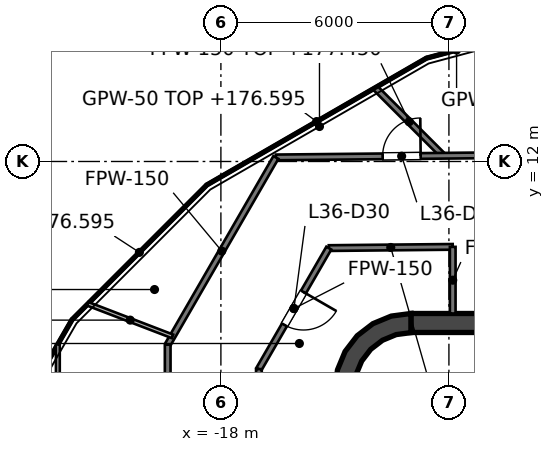
"""IFC4 building model, lengths in metres.
Left out: names, types, materials, properties, quantities, classifications, styles, units other than length and angle.
Written with IfcOpenShell. Run it as: python <this file> out.ifc"""

import sys

from ifc_helpers import new_model, si_unit, direction, frame, frame_2d, origin, place, context, subcontext, project, spatial, polyline, rectangle, outline, extrude, element, fill, save


model = new_model("IFC4")
c1 = context("Model", 3, precision=1e-05, world=origin(), true_north=direction((0.0, 1.0)))
c2 = subcontext(c1, "Body", "Model", "MODEL_VIEW")
j1 = project(units=[si_unit("LENGTHUNIT", "METRE"), si_unit("PLANEANGLEUNIT", "RADIAN")], contexts=[c1])
p1 = place(None, origin())
s1 = spatial("IfcSite", under=j1, at=p1, CompositionType="ELEMENT")
p2 = place(p1, origin())
s2 = spatial("IfcBuilding", under=s1, at=p2, CompositionType="ELEMENT")
p3 = place(p2, frame((0.0, 0.0, 173.6)))
s3 = spatial("IfcBuildingStorey", under=s2, at=p3, CompositionType="ELEMENT", Elevation=173.6)
p4 = place(p3, frame((-13.0, 7.75, 0.0), z_axis=(0.0, 0.0, 1.0), x_axis=(1.0, 0.0, 0.0)))
e1 = element("IfcWall", 1, at=p4, inside=s3, PredefinedType="SHEAR", context=c2, shape_type="SweptSolid", body=[
    extrude(rectangle(XDim=26.0, YDim=0.5, at=frame_2d((13.0, 0.0))), origin(), (0.0, 0.0, 1.0), 4.0),
])
p5 = place(p4, frame((1.7, 0.0, 0.0)))
e2 = element("IfcOpeningElement", 2, at=p5, cuts=e1, PredefinedType="OPENING", context=c2, shape_type="SweptSolid", body=[
    extrude(rectangle(XDim=1.8, YDim=2.1, at=frame_2d((0.9, 1.05))), frame((0.0, 0.25, 0.0), z_axis=(0.0, -1.0, 0.0), x_axis=(1.0, 0.0, 0.0)), (0.0, 0.0, 1.0), 0.5),
])
p6 = place(p4, frame((22.5, 0.0, 0.0)))
e3 = element("IfcOpeningElement", 3, at=p6, cuts=e1, PredefinedType="OPENING", context=c2, shape_type="SweptSolid", body=[
    extrude(rectangle(XDim=1.8, YDim=2.1, at=frame_2d((0.9, 1.05))), frame((0.0, 0.25, 0.0), z_axis=(0.0, -1.0, 0.0), x_axis=(1.0, 0.0, 0.0)), (0.0, 0.0, 1.0), 0.5),
])
p7 = place(p3, origin())
e4 = element("IfcWall", 4, at=p7, inside=s3, PredefinedType="SHEAR", context=c2, shape_type="SweptSolid", body=[
    extrude(outline(polyline([(-15.0, 6.0), (-14.496, 6.0), (-14.445, 6.387), (-14.295, 6.748), (-14.058, 7.058), (-13.748, 7.295), (-13.387, 7.445), (-13.0, 7.496), (-13.0, 8.0), (-13.518, 7.932), (-14.0, 7.732), (-14.414, 7.414), (-14.732, 7.0), (-14.932, 6.518), (-15.0, 6.0)])), origin(), (0.0, 0.0, 1.0), 4.0),
])
p8 = place(p3, frame((-11.8, -7.5, 0.0), z_axis=(0.0, 0.0, 1.0), x_axis=(0.0, 1.0, 0.0)))
e5 = element("IfcWall", 5, at=p8, inside=s3, PredefinedType="SOLIDWALL", context=c2, shape_type="SweptSolid", body=[
    extrude(rectangle(XDim=15.0, YDim=0.4, at=frame_2d((7.5, 0.0))), origin(), (0.0, 0.0, 1.0), 3.85),
])
p9 = place(p8, frame((11.3, 0.0, 0.0)))
e6 = element("IfcOpeningElement", 6, at=p9, cuts=e5, PredefinedType="OPENING", context=c2, shape_type="SweptSolid", body=[
    extrude(rectangle(XDim=1.1, YDim=2.1, at=frame_2d((0.55, 1.05))), frame((0.0, 0.2, 0.0), z_axis=(0.0, -1.0, 0.0), x_axis=(1.0, 0.0, 0.0)), (0.0, 0.0, 1.0), 0.4),
])
p10 = place(p8, frame((8.4, 0.0, 0.0)))
e7 = element("IfcOpeningElement", 7, at=p10, cuts=e5, PredefinedType="OPENING", context=c2, shape_type="SweptSolid", body=[
    extrude(rectangle(XDim=1.1, YDim=2.1, at=frame_2d((0.55, 1.05))), frame((0.0, 0.2, 0.0), z_axis=(0.0, -1.0, 0.0), x_axis=(1.0, 0.0, 0.0)), (0.0, 0.0, 1.0), 0.4),
])
p11 = place(p8, frame((5.5, 0.0, 0.0)))
e8 = element("IfcOpeningElement", 8, at=p11, cuts=e5, PredefinedType="OPENING", context=c2, shape_type="SweptSolid", body=[
    extrude(rectangle(XDim=1.1, YDim=2.1, at=frame_2d((0.55, 1.05))), frame((0.0, 0.2, 0.0), z_axis=(0.0, -1.0, 0.0), x_axis=(1.0, 0.0, 0.0)), (0.0, 0.0, 1.0), 0.4),
])
p12 = place(p8, frame((13.697, 0.0, 0.0)))
e9 = element("IfcOpeningElement", 9, at=p12, cuts=e5, PredefinedType="OPENING", context=c2, shape_type="SweptSolid", body=[
    extrude(rectangle(XDim=0.9, YDim=2.1, at=frame_2d((0.45, 1.05))), frame((0.0, 0.2, 0.0), z_axis=(0.0, -1.0, 0.0), x_axis=(1.0, 0.0, 0.0)), (0.0, 0.0, 1.0), 0.4),
])
p13 = place(p8, frame((0.403, 0.0, 0.0)))
e10 = element("IfcOpeningElement", 10, at=p13, cuts=e5, PredefinedType="OPENING", context=c2, shape_type="SweptSolid", body=[
    extrude(rectangle(XDim=0.9, YDim=2.1, at=frame_2d((0.45, 1.05))), frame((0.0, 0.2, 0.0), z_axis=(0.0, -1.0, 0.0), x_axis=(1.0, 0.0, 0.0)), (0.0, 0.0, 1.0), 0.4),
])
p14 = place(p3, frame((-13.94, 13.94, 0.0), z_axis=(0.0, 0.0, 1.0), x_axis=(0.707106781187, -0.707106781187, 0.0)))
e11 = element("IfcWall", 11, at=p14, inside=s3, PredefinedType="PARTITIONING", context=c2, shape_type="SweptSolid", body=[
    extrude(rectangle(XDim=2.53, YDim=0.15, at=frame_2d((1.265, 0.0))), origin(), (0.0, 0.0, 1.0), 3.85),
])
p15 = place(p3, frame((-15.161, 9.721, 0.0), z_axis=(0.0, 0.0, 1.0), x_axis=(0.999950429518, 0.009956832157, 0.0)))
e12 = element("IfcWall", 12, at=p15, inside=s3, PredefinedType="PARTITIONING", context=c2, shape_type="SweptSolid", body=[
    extrude(rectangle(XDim=3.261, YDim=0.15, at=frame_2d((1.631, 0.0))), origin(), (0.0, 0.0, 1.0), 2.995),
])
p16 = place(p3, frame((-16.555, 12.107, 0.0), z_axis=(0.0, 0.0, 1.0), x_axis=(0.999950956073, 0.009903809825, 0.0)))
e13 = element("IfcWall", 13, at=p16, inside=s3, PredefinedType="PARTITIONING", context=c2, shape_type="SweptSolid", body=[
    extrude(rectangle(XDim=30.715, YDim=0.15, at=frame_2d((15.358, 0.0))), origin(), (0.0, 0.0, 1.0), 2.927),
])
p17 = place(p16, frame((27.575, 0.0, 0.0)))
e14 = element("IfcOpeningElement", 14, at=p17, cuts=e13, PredefinedType="OPENING", context=c2, shape_type="SweptSolid", body=[
    extrude(rectangle(XDim=1.0, YDim=2.1, at=frame_2d((0.5, 1.05))), frame((0.0, 0.075, 0.0), z_axis=(0.0, -1.0, 0.0), x_axis=(1.0, 0.0, 0.0)), (0.0, 0.0, 1.0), 0.15),
])
p18 = place(p16, frame((20.496, 0.0, 0.0)))
e15 = element("IfcOpeningElement", 15, at=p18, cuts=e13, PredefinedType="OPENING", context=c2, shape_type="SweptSolid", body=[
    extrude(rectangle(XDim=1.0, YDim=2.1, at=frame_2d((0.5, 1.05))), frame((0.0, 0.075, 0.0), z_axis=(0.0, -1.0, 0.0), x_axis=(1.0, 0.0, 0.0)), (0.0, 0.0, 1.0), 0.15),
])
p19 = place(p16, frame((13.746, 0.0, 0.0)))
e16 = element("IfcOpeningElement", 16, at=p19, cuts=e13, PredefinedType="OPENING", context=c2, shape_type="SweptSolid", body=[
    extrude(rectangle(XDim=1.0, YDim=2.1, at=frame_2d((0.5, 1.05))), frame((0.0, 0.075, 0.0), z_axis=(0.0, -1.0, 0.0), x_axis=(1.0, 0.0, 0.0)), (0.0, 0.0, 1.0), 0.15),
])
p20 = place(p16, frame((7.941, 0.0, 0.0)))
e17 = element("IfcOpeningElement", 17, at=p20, cuts=e13, PredefinedType="OPENING", context=c2, shape_type="SweptSolid", body=[
    extrude(rectangle(XDim=1.0, YDim=2.1, at=frame_2d((0.5, 1.05))), frame((0.0, 0.075, 0.0), z_axis=(0.0, -1.0, 0.0), x_axis=(1.0, 0.0, 0.0)), (0.0, 0.0, 1.0), 0.15),
])
p21 = place(p16, frame((2.812, 0.0, 0.0)))
e18 = element("IfcOpeningElement", 18, at=p21, cuts=e13, PredefinedType="OPENING", context=c2, shape_type="SweptSolid", body=[
    extrude(rectangle(XDim=1.0, YDim=2.1, at=frame_2d((0.5, 1.05))), frame((0.0, 0.075, 0.0), z_axis=(0.0, -1.0, 0.0), x_axis=(1.0, 0.0, 0.0)), (0.0, 0.0, 1.0), 0.15),
])
p22 = place(p3, frame((-17.0, 6.536, 0.0), z_axis=(0.0, 0.0, 1.0), x_axis=(0.500251054866, 0.865880408662, 0.0)))
e19 = element("IfcWall", 19, at=p22, inside=s3, PredefinedType="PARTITIONING", context=c2, shape_type="SweptSolid", body=[
    extrude(rectangle(XDim=3.678, YDim=0.15, at=frame_2d((1.839, 0.0))), origin(), (0.0, 0.0, 1.0), 2.995),
])
p23 = place(p22, frame((1.344, 0.0, 0.0)))
e20 = element("IfcOpeningElement", 20, at=p23, cuts=e19, PredefinedType="OPENING", context=c2, shape_type="SweptSolid", body=[
    extrude(rectangle(XDim=1.0, YDim=2.1, at=frame_2d((0.5, 1.05))), frame((0.0, 0.075, 0.0), z_axis=(0.0, -1.0, 0.0), x_axis=(1.0, 0.0, 0.0)), (0.0, 0.0, 1.0), 0.15),
])
p24 = place(p3, frame((-19.4, 7.179, 0.0), z_axis=(0.0, 0.0, 1.0), x_axis=(0.500222556585, 0.865896872545, 0.0)))
e21 = element("IfcWall", 21, at=p24, inside=s3, PredefinedType="PARTITIONING", context=c2, shape_type="SweptSolid", body=[
    extrude(rectangle(XDim=5.69, YDim=0.15, at=frame_2d((2.845, 0.0))), origin(), (0.0, 0.0, 1.0), 2.995),
])
p25 = place(p3, frame((-11.9, 8.0, 0.0), z_axis=(0.0, 0.0, 1.0), x_axis=(0.0, 1.0, 0.0)))
e22 = element("IfcWall", 22, at=p25, inside=s3, PredefinedType="PARTITIONING", context=c2, shape_type="SweptSolid", body=[
    extrude(rectangle(XDim=1.753, YDim=0.15, at=frame_2d((0.876, 0.0))), origin(), (0.0, 0.0, 1.0), 2.995),
])
p26 = place(p3, frame((-17.0, -6.398, 0.0), z_axis=(0.0, 0.0, 1.0), x_axis=(0.0, 1.0, 0.0)))
e23 = element("IfcWall", 23, at=p26, inside=s3, PredefinedType="PARTITIONING", context=c2, shape_type="SweptSolid", body=[
    extrude(rectangle(XDim=12.934, YDim=0.15, at=frame_2d((6.467, 0.0))), origin(), (0.0, 0.0, 1.0), 2.927),
])
p27 = place(p26, frame((5.742, 0.0, 0.0)))
e24 = element("IfcOpeningElement", 24, at=p27, cuts=e23, PredefinedType="OPENING", context=c2, shape_type="SweptSolid", body=[
    extrude(rectangle(XDim=1.0, YDim=2.1, at=frame_2d((0.5, 1.05))), frame((0.0, 0.075, 0.0), z_axis=(0.0, -1.0, 0.0), x_axis=(1.0, 0.0, 0.0)), (0.0, 0.0, 1.0), 0.15),
])
p28 = place(p3, frame((-19.4, -6.876, 0.0), z_axis=(0.0, 0.0, 1.0), x_axis=(0.0, 1.0, 0.0)))
e25 = element("IfcWall", 25, at=p28, inside=s3, PredefinedType="PARTITIONING", context=c2, shape_type="SweptSolid", body=[
    extrude(rectangle(XDim=14.055, YDim=0.15, at=frame_2d((7.027, 0.0))), origin(), (0.0, 0.0, 1.0), 2.927),
])
p29 = place(p28, frame((7.316, 0.0, 0.0)))
e26 = element("IfcOpeningElement", 26, at=p29, cuts=e25, PredefinedType="OPENING", context=c2, shape_type="SweptSolid", body=[
    extrude(rectangle(XDim=1.0, YDim=2.1, at=frame_2d((0.5, 1.05))), frame((0.0, 0.075, 0.0), z_axis=(0.0, -1.0, 0.0), x_axis=(1.0, 0.0, 0.0)), (0.0, 0.0, 1.0), 0.15),
])
p30 = place(p3, frame((-12.591, 14.719, 0.0), z_axis=(0.0, 0.0, 1.0), x_axis=(0.965982574514, 0.258607164896, 0.0)))
e27 = element("IfcWall", 27, at=p30, inside=s3, PredefinedType="PARTITIONING", context=c2, shape_type="SweptSolid", body=[
    extrude(rectangle(XDim=1.641, YDim=0.05, at=frame_2d((0.82, 0.0))), origin(), (0.0, 0.0, 1.0), 2.927),
])
p31 = place(p3, frame((-18.371, 11.382, 0.0), z_axis=(0.0, 0.0, 1.0), x_axis=(0.866021723044, 0.500006375176, 0.0)))
e28 = element("IfcWall", 28, at=p31, inside=s3, PredefinedType="PARTITIONING", context=c2, shape_type="SweptSolid", body=[
    extrude(rectangle(XDim=6.674, YDim=0.05, at=frame_2d((3.337, 0.0))), origin(), (0.0, 0.0, 1.0), 2.995),
])
p32 = place(p3, frame((-21.919, 7.834, 0.0), z_axis=(0.0, 0.0, 1.0), x_axis=(0.707082452305, 0.707131109231, 0.0)))
e29 = element("IfcWall", 29, at=p32, inside=s3, PredefinedType="PARTITIONING", context=c2, shape_type="SweptSolid", body=[
    extrude(rectangle(XDim=5.018, YDim=0.05, at=frame_2d((2.509, 0.0))), origin(), (0.0, 0.0, 1.0), 2.995),
])
p33 = place(p3, frame((-23.832, 4.52, 0.0), z_axis=(0.0, 0.0, 1.0), x_axis=(0.499878937759, 0.866095287821, 0.0)))
e30 = element("IfcWall", 30, at=p33, inside=s3, PredefinedType="PARTITIONING", context=c2, shape_type="SweptSolid", body=[
    extrude(rectangle(XDim=3.827, YDim=0.05, at=frame_2d((1.913, 0.0))), origin(), (0.0, 0.0, 1.0), 2.927),
])
p34 = place(p3, frame((-21.5, 8.253, 0.0), z_axis=(0.0, 0.0, 1.0), x_axis=(0.933566994355, -0.358402939512, 0.0)))
e31 = element("IfcWall", 31, at=p34, inside=s3, PredefinedType="PARTITIONING", context=c2, shape_type="SweptSolid", body=[
    extrude(rectangle(XDim=2.385, YDim=0.1, at=frame_2d((1.193, 0.0))), origin(), (0.0, 0.0, 1.0), 3.85),
])
p35 = place(p3, frame((-22.29, -7.451, 0.0), z_axis=(0.0, 0.0, 1.0), x_axis=(0.0, 1.0, 0.0)))
e32 = element("IfcWall", 32, at=p35, inside=s3, PredefinedType="PARTITIONING", context=c2, shape_type="SweptSolid", body=[
    extrude(rectangle(XDim=14.642, YDim=0.1, at=frame_2d((7.321, 0.0))), origin(), (0.0, 0.0, 1.0), 2.927),
])
p36 = place(p35, frame((7.611, 0.0, 0.0)))
e33 = element("IfcOpeningElement", 33, at=p36, cuts=e32, PredefinedType="OPENING", context=c2, shape_type="SweptSolid", body=[
    extrude(rectangle(XDim=0.9, YDim=2.1, at=frame_2d((0.45, 1.05))), frame((0.0, 0.05, 0.0), z_axis=(0.0, -1.0, 0.0), x_axis=(1.0, 0.0, 0.0)), (0.0, 0.0, 1.0), 0.1),
])
p37 = place(p12, origin())
e34 = element("IfcDoor", 34, at=p37, inside=s3, OperationType="SINGLE_SWING_LEFT", PredefinedType="DOOR", context=c2, shape_type="SweptSolid", body=[
    extrude(rectangle(XDim=0.9, YDim=2.1, at=frame_2d((0.45, 1.05))), frame((0.0, 0.025, 0.0), z_axis=(0.0, -1.0, 0.0), x_axis=(1.0, 0.0, 0.0)), (0.0, 0.0, 1.0), 0.05),
])
fill(e9, e34)
p38 = place(p23, origin())
e35 = element("IfcDoor", 35, at=p38, inside=s3, OperationType="SINGLE_SWING_RIGHT", PredefinedType="DOOR", context=c2, shape_type="SweptSolid", body=[
    extrude(rectangle(XDim=1.0, YDim=2.1, at=frame_2d((0.5, 1.05))), frame((0.0, 0.025, 0.0), z_axis=(0.0, -1.0, 0.0), x_axis=(1.0, 0.0, 0.0)), (0.0, 0.0, 1.0), 0.05),
])
fill(e20, e35)
p39 = place(p21, origin())
e36 = element("IfcDoor", 36, at=p39, inside=s3, OperationType="SINGLE_SWING_RIGHT", PredefinedType="DOOR", context=c2, shape_type="SweptSolid", body=[
    extrude(rectangle(XDim=1.0, YDim=2.1, at=frame_2d((0.5, 1.05))), frame((0.0, 0.025, 0.0), z_axis=(0.0, -1.0, 0.0), x_axis=(1.0, 0.0, 0.0)), (0.0, 0.0, 1.0), 0.05),
])
fill(e18, e36)
save(model, sys.argv[1])
